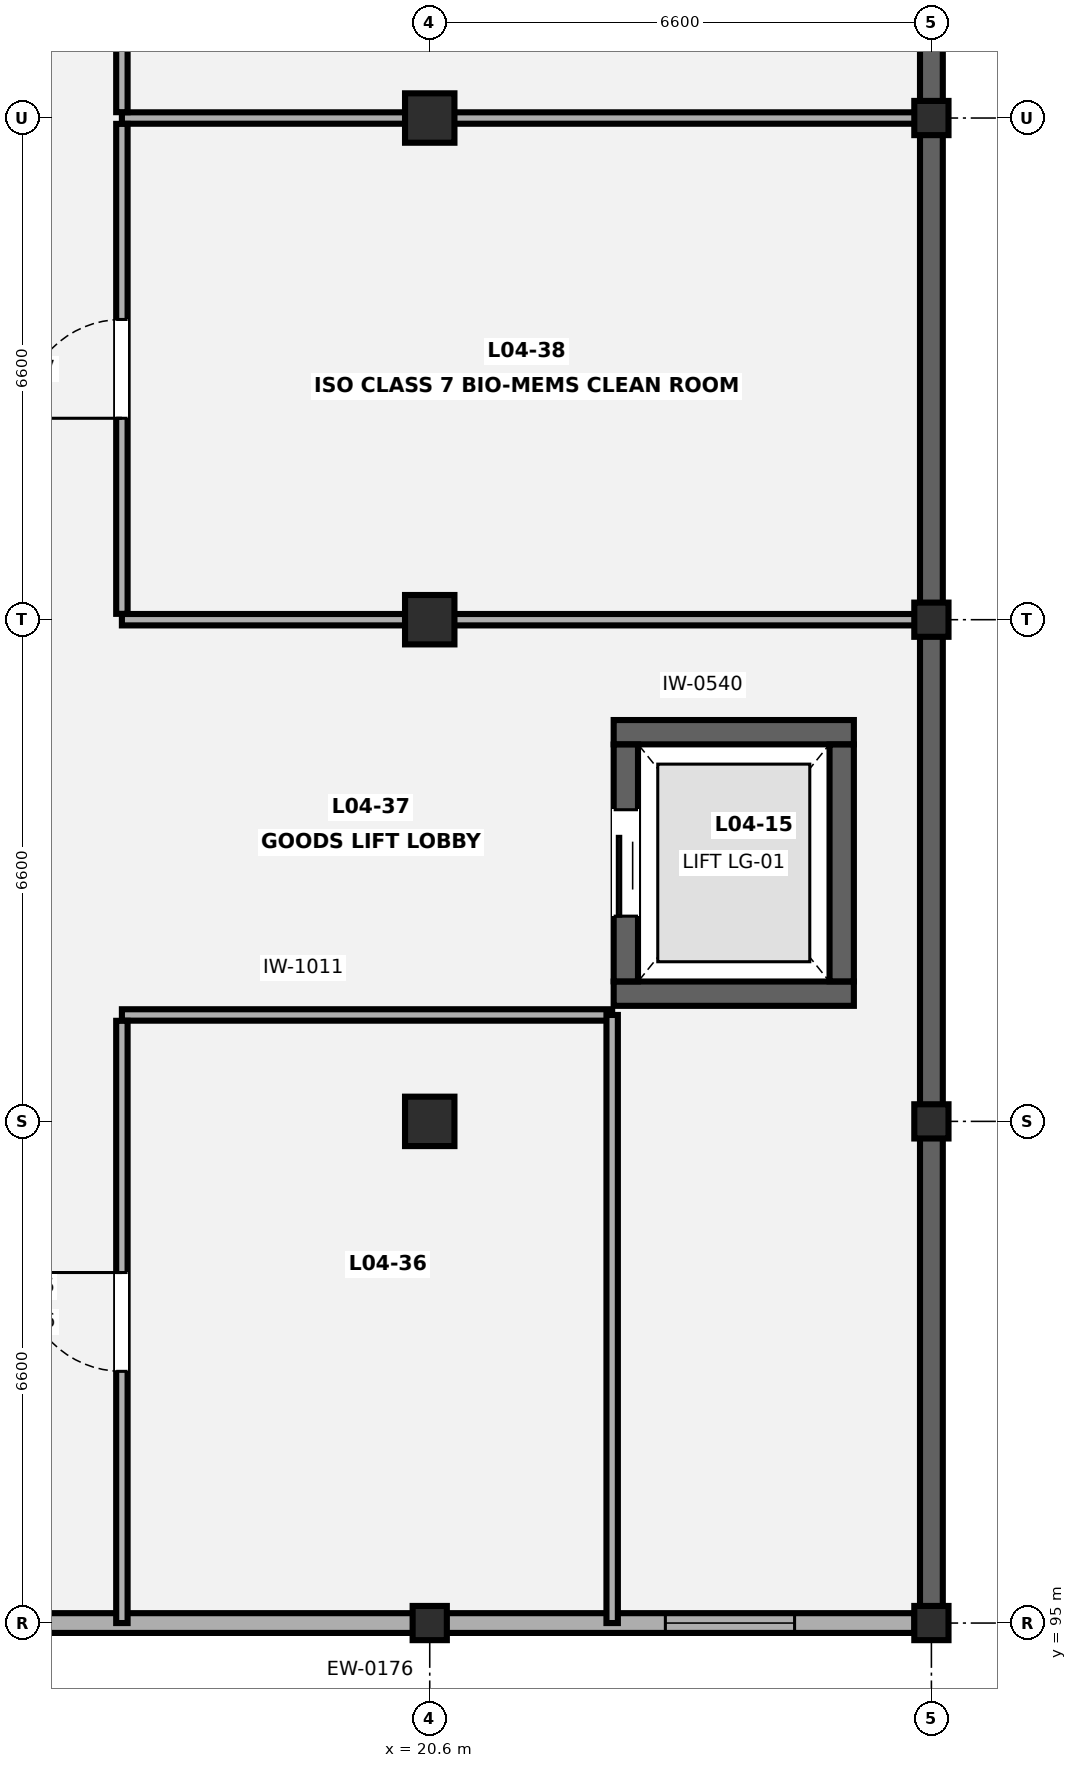
"""IFC4 building model, lengths in metres.
Left out: names, types, materials, properties, quantities, classifications, styles, units other than length and angle.
Written with IfcOpenShell. Run it as: python <this file> out.ifc"""

import sys

from ifc_helpers import new_model, si_unit, direction, frame, frame_2d, origin, origin_2d, place, context, subcontext, project, spatial, rectangle, extrude, element, fill, save


model = new_model("IFC4")
c1 = context("Model", 3, precision=1e-05, world=origin(), true_north=direction((0.0, 1.0)))
c2 = subcontext(c1, "Body", "Model", "MODEL_VIEW")
j1 = project(units=[si_unit("LENGTHUNIT", "METRE"), si_unit("PLANEANGLEUNIT", "RADIAN")], contexts=[c1])
p1 = place(None, origin())
s1 = spatial("IfcSite", under=j1, at=p1, CompositionType="ELEMENT")
p2 = place(p1, origin())
s2 = spatial("IfcBuilding", under=s1, at=p2, CompositionType="ELEMENT")
p3 = place(p2, frame((0.0, 0.0, 17.5)))
s3 = spatial("IfcBuildingStorey", under=s2, at=p3, CompositionType="ELEMENT", Elevation=17.5)
p4 = place(p3, frame((20.6, 95.0, 0.0), z_axis=(0.0, 0.0, 1.0), x_axis=(1.0, 0.0, 0.0)))
e1 = element("IfcColumn", 1, at=p4, inside=s3, PredefinedType="PILASTER", context=c2, shape_type="SweptSolid", body=[
    extrude(rectangle(XDim=0.45, YDim=0.45, at=origin_2d()), origin(), (0.0, 0.0, 1.0), 4.2),
])
for number, where, z_axis, x_axis in (
    (2, (20.6, 101.6, 0.0), (0.0, 0.0, 1.0), (1.0, 0.0, 0.0)),
    (3, (20.6, 108.2, 0.0), (0.0, 0.0, 1.0), (1.0, 0.0, 0.0)),
    (4, (20.6, 114.8, 0.0), (0.0, 0.0, 1.0), (1.0, 0.0, 0.0)),
):
    element("IfcColumn", number, at=place(p3, frame(where, z_axis=z_axis, x_axis=x_axis)), inside=s3, PredefinedType="COLUMN", context=c2, shape_type="SweptSolid", body=[
        extrude(rectangle(XDim=0.65, YDim=0.65, at=origin_2d()), origin(), (0.0, 0.0, 1.0), 4.2),
    ])
for number, where, z_axis, x_axis in (
    (5, (27.2, 95.0, 0.0), (0.0, 0.0, 1.0), (1.0, 0.0, 0.0)),
    (6, (27.2, 101.6, 0.0), (0.0, 0.0, 1.0), (1.0, 0.0, 0.0)),
    (7, (27.2, 108.2, 0.0), (0.0, 0.0, 1.0), (1.0, 0.0, 0.0)),
    (8, (27.2, 114.8, 0.0), (0.0, 0.0, 1.0), (1.0, 0.0, 0.0)),
):
    element("IfcColumn", number, at=place(p3, frame(where, z_axis=z_axis, x_axis=x_axis)), inside=s3, PredefinedType="PILASTER", context=c2, shape_type="SweptSolid", body=[
        extrude(rectangle(XDim=0.45, YDim=0.45, at=origin_2d()), origin(), (0.0, 0.0, 1.0), 4.2),
    ])
p5 = place(p3, frame((27.2, 147.577, 0.0), z_axis=(0.0, 0.0, 1.0), x_axis=(0.0, -1.0, 0.0)))
e9 = element("IfcWall", 9, at=p5, inside=s3, PredefinedType="SOLIDWALL", context=c2, shape_type="SweptSolid", body=[
    extrude(rectangle(XDim=52.354, YDim=0.3, at=frame_2d((26.177, 0.0))), origin(), (0.0, 0.0, 1.0), 3.84),
])
p6 = place(p3, frame((26.977, 95.0, 0.0), z_axis=(0.0, 0.0, 1.0), x_axis=(-1.0, 0.0, 0.0)))
e10 = element("IfcWall", 10, at=p6, inside=s3, PredefinedType="SOLIDWALL", context=c2, shape_type="SweptSolid", body=[
    extrude(rectangle(XDim=19.354, YDim=0.26, at=frame_2d((9.677, 0.0))), origin(), (0.0, 0.0, 1.0), 2.48),
])
p7 = place(p6, frame((1.577, 0.0, 0.85)))
e11 = element("IfcOpeningElement", 11, at=p7, cuts=e10, PredefinedType="OPENING", context=c2, shape_type="SweptSolid", body=[
    extrude(rectangle(XDim=1.7, YDim=1.4, at=frame_2d((0.85, 0.7))), frame((0.0, 0.14, 0.0), z_axis=(0.0, -1.0, 0.0), x_axis=(1.0, 0.0, 0.0)), (0.0, 0.0, 1.0), 0.28),
])
for number, where, z_axis, x_axis in (
    (12, (23.02, 103.28, 0.0), (0.0, 0.0, 1.0), (1.0, 0.0, 0.0)),
    (13, (23.02, 106.72, 0.0), (0.0, 0.0, 1.0), (1.0, 0.0, 0.0)),
):
    element("IfcWall", number, at=place(p3, frame(where, z_axis=z_axis, x_axis=x_axis)), inside=s3, PredefinedType="SHEAR", context=c2, shape_type="SweptSolid", body=[
        extrude(rectangle(XDim=3.16, YDim=0.32, at=frame_2d((1.58, 0.0))), origin(), (0.0, 0.0, 1.0), 3.85),
    ])
p8 = place(p3, frame((23.18, 103.442, 0.0), z_axis=(0.0, 0.0, 1.0), x_axis=(0.0, 1.0, 0.0)))
e14 = element("IfcWall", 14, at=p8, inside=s3, PredefinedType="SHEAR", context=c2, shape_type="SweptSolid", body=[
    extrude(rectangle(XDim=3.116, YDim=0.32, at=frame_2d((1.558, 0.0))), origin(), (0.0, 0.0, 1.0), 3.85),
])
p9 = place(p8, frame((0.858, 0.0, 0.0)))
e15 = element("IfcOpeningElement", 15, at=p9, cuts=e14, PredefinedType="OPENING", context=c2, shape_type="SweptSolid", body=[
    extrude(rectangle(XDim=1.4, YDim=2.25, at=frame_2d((0.7, 1.125))), frame((0.0, 0.17, 0.0), z_axis=(0.0, -1.0, 0.0), x_axis=(1.0, 0.0, 0.0)), (0.0, 0.0, 1.0), 0.34),
])
p10 = place(p3, frame((26.02, 103.442, 0.0), z_axis=(0.0, 0.0, 1.0), x_axis=(0.0, 1.0, 0.0)))
e16 = element("IfcWall", 16, at=p10, inside=s3, PredefinedType="SHEAR", context=c2, shape_type="SweptSolid", body=[
    extrude(rectangle(XDim=3.116, YDim=0.32, at=frame_2d((1.558, 0.0))), origin(), (0.0, 0.0, 1.0), 3.85),
])
p11 = place(p3, frame((16.55, 103.0, 0.0), z_axis=(0.0, 0.0, 1.0), x_axis=(1.0, 0.0, 0.0)))
e17 = element("IfcWall", 17, at=p11, inside=s3, PredefinedType="PARTITIONING", context=c2, shape_type="SweptSolid", body=[
    extrude(rectangle(XDim=6.45, YDim=0.15, at=frame_2d((3.225, 0.0))), origin(), (0.0, 0.0, 1.0), 3.85),
])
p12 = place(p3, frame((16.55, 95.0, 0.0), z_axis=(0.0, 0.0, 1.0), x_axis=(0.0, 1.0, 0.0)))
e18 = element("IfcWall", 18, at=p12, inside=s3, PredefinedType="PARTITIONING", context=c2, shape_type="SweptSolid", body=[
    extrude(rectangle(XDim=7.923, YDim=0.15, at=frame_2d((3.961, 0.0))), origin(), (0.0, 0.0, 1.0), 3.85),
])
p13 = place(p12, frame((3.312, 0.0, 0.0)))
e19 = element("IfcOpeningElement", 19, at=p13, cuts=e18, PredefinedType="OPENING", context=c2, shape_type="SweptSolid", body=[
    extrude(rectangle(XDim=1.3, YDim=2.2, at=frame_2d((0.65, 1.1))), frame((0.0, 0.085, 0.0), z_axis=(0.0, -1.0, 0.0), x_axis=(1.0, 0.0, 0.0)), (0.0, 0.0, 1.0), 0.17),
])
p14 = place(p3, frame((23.0, 95.0, 0.0), z_axis=(0.0, 0.0, 1.0), x_axis=(0.0, 1.0, 0.0)))
e20 = element("IfcWall", 20, at=p14, inside=s3, PredefinedType="PARTITIONING", context=c2, shape_type="SweptSolid", body=[
    extrude(rectangle(XDim=8.0, YDim=0.15, at=frame_2d((4.0, 0.0))), origin(), (0.0, 0.0, 1.0), 3.85),
])
for number, where, z_axis, x_axis in (
    (21, (16.55, 108.2, 0.0), (0.0, 0.0, 1.0), (1.0, 0.0, 0.0)),
    (22, (16.55, 114.8, 0.0), (0.0, 0.0, 1.0), (1.0, 0.0, 0.0)),
):
    element("IfcWall", number, at=place(p3, frame(where, z_axis=z_axis, x_axis=x_axis)), inside=s3, PredefinedType="PARTITIONING", context=c2, shape_type="SweptSolid", body=[
        extrude(rectangle(XDim=10.538, YDim=0.15, at=frame_2d((5.269, 0.0))), origin(), (0.0, 0.0, 1.0), 2.435),
    ])
p15 = place(p3, frame((16.55, 108.277, 0.0), z_axis=(0.0, 0.0, 1.0), x_axis=(0.0, 1.0, 0.0)))
e23 = element("IfcWall", 23, at=p15, inside=s3, PredefinedType="PARTITIONING", context=c2, shape_type="SweptSolid", body=[
    extrude(rectangle(XDim=6.446, YDim=0.15, at=frame_2d((3.223, 0.0))), origin(), (0.0, 0.0, 1.0), 3.85),
])
p16 = place(p15, frame((2.573, 0.0, 0.0)))
e24 = element("IfcOpeningElement", 24, at=p16, cuts=e23, PredefinedType="OPENING", context=c2, shape_type="SweptSolid", body=[
    extrude(rectangle(XDim=1.3, YDim=2.2, at=frame_2d((0.65, 1.1))), frame((0.0, 0.085, 0.0), z_axis=(0.0, -1.0, 0.0), x_axis=(1.0, 0.0, 0.0)), (0.0, 0.0, 1.0), 0.17),
])
p17 = place(p3, frame((16.55, 114.877, 0.0), z_axis=(0.0, 0.0, 1.0), x_axis=(0.0, 1.0, 0.0)))
e25 = element("IfcWall", 25, at=p17, inside=s3, PredefinedType="PARTITIONING", context=c2, shape_type="SweptSolid", body=[
    extrude(rectangle(XDim=13.046, YDim=0.15, at=frame_2d((6.523, 0.0))), origin(), (0.0, 0.0, 1.0), 3.85),
])
p18 = place(p17, frame((5.873, 0.0, 0.0)))
e26 = element("IfcOpeningElement", 26, at=p18, cuts=e25, PredefinedType="OPENING", context=c2, shape_type="SweptSolid", body=[
    extrude(rectangle(XDim=1.3, YDim=2.2, at=frame_2d((0.65, 1.1))), frame((0.0, 0.085, 0.0), z_axis=(0.0, -1.0, 0.0), x_axis=(1.0, 0.0, 0.0)), (0.0, 0.0, 1.0), 0.17),
])
p19 = place(p7, origin())
e27 = element("IfcWindow", 27, at=p19, inside=s3, PartitioningType="SINGLE_PANEL", PredefinedType="WINDOW", context=c2, shape_type="SweptSolid", body=[
    extrude(rectangle(XDim=1.7, YDim=1.4, at=frame_2d((0.85, 0.7))), frame((0.0, 0.03, 0.0), z_axis=(0.0, -1.0, 0.0), x_axis=(1.0, 0.0, 0.0)), (0.0, 0.0, 1.0), 0.06),
])
fill(e11, e27)
p20 = place(p9, origin())
e28 = element("IfcDoor", 28, at=p20, inside=s3, OperationType="DOUBLE_DOOR_SLIDING", PredefinedType="DOOR", context=c2, shape_type="SweptSolid", body=[
    extrude(rectangle(XDim=1.4, YDim=2.25, at=frame_2d((0.7, 1.125))), frame((0.0, 0.025, 0.0), z_axis=(0.0, -1.0, 0.0), x_axis=(1.0, 0.0, 0.0)), (0.0, 0.0, 1.0), 0.05),
])
fill(e15, e28)
p21 = place(p13, origin())
e29 = element("IfcDoor", 29, at=p21, inside=s3, OperationType="SINGLE_SWING_RIGHT", PredefinedType="DOOR", context=c2, shape_type="SweptSolid", body=[
    extrude(rectangle(XDim=1.3, YDim=2.2, at=frame_2d((0.65, 1.1))), frame((0.0, 0.025, 0.0), z_axis=(0.0, -1.0, 0.0), x_axis=(1.0, 0.0, 0.0)), (0.0, 0.0, 1.0), 0.05),
])
fill(e19, e29)
p22 = place(p16, origin())
e30 = element("IfcDoor", 30, at=p22, inside=s3, OperationType="SINGLE_SWING_LEFT", PredefinedType="DOOR", context=c2, shape_type="SweptSolid", body=[
    extrude(rectangle(XDim=1.3, YDim=2.2, at=frame_2d((0.65, 1.1))), frame((0.0, 0.025, 0.0), z_axis=(0.0, -1.0, 0.0), x_axis=(1.0, 0.0, 0.0)), (0.0, 0.0, 1.0), 0.05),
])
fill(e24, e30)
save(model, sys.argv[1])
